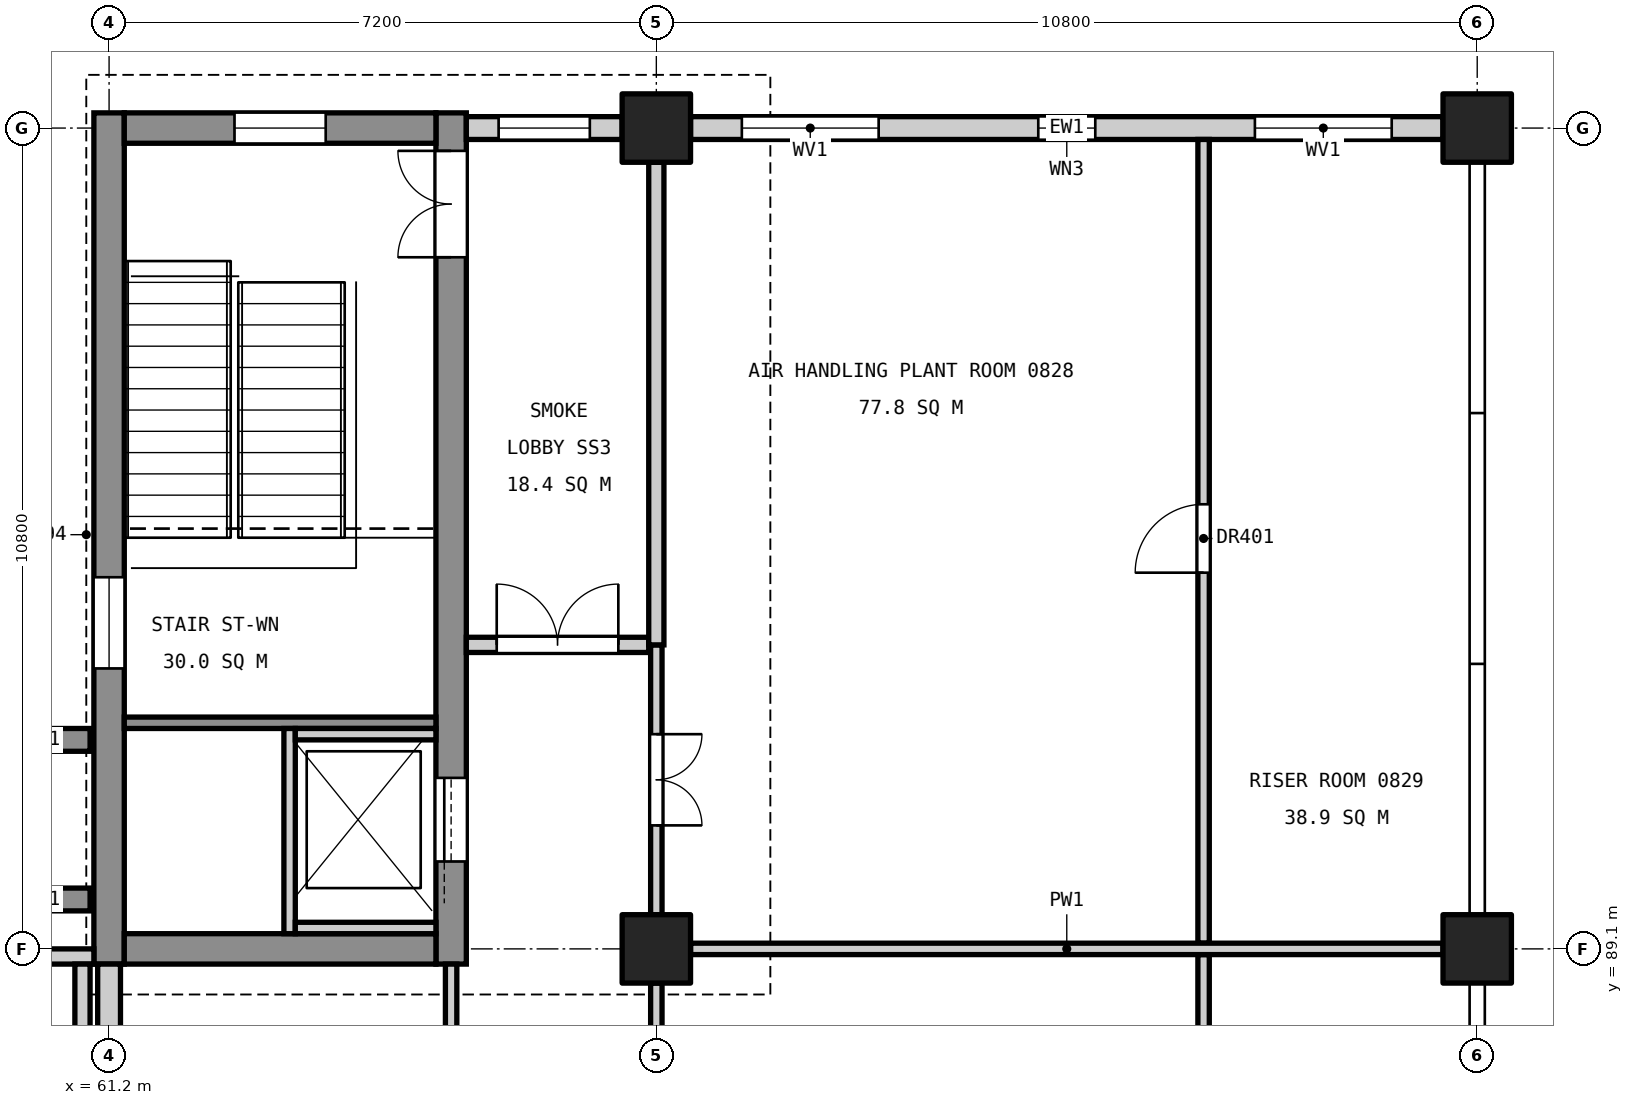
"""IFC4 building model, lengths in metres.
Left out: names, types, materials, properties, quantities, classifications, styles, units other than length and angle.
Written with IfcOpenShell. Run it as: python <this file> out.ifc"""

import sys

from ifc_helpers import new_model, si_unit, direction, frame, frame_2d, origin, origin_2d, place, context, subcontext, project, spatial, rectangle, extrude, element, fill, save


model = new_model("IFC4")
c1 = context("Model", 3, precision=1e-05, world=origin(), true_north=direction((0.0, 1.0)))
c2 = subcontext(c1, "Body", "Model", "MODEL_VIEW")
j1 = project(units=[si_unit("LENGTHUNIT", "METRE"), si_unit("PLANEANGLEUNIT", "RADIAN")], contexts=[c1])
p1 = place(None, origin())
s1 = spatial("IfcSite", under=j1, at=p1, CompositionType="ELEMENT")
p2 = place(p1, origin())
s2 = spatial("IfcBuilding", under=s1, at=p2, CompositionType="ELEMENT")
p3 = place(p2, frame((0.0, 0.0, 41.4)))
s3 = spatial("IfcBuildingStorey", under=s2, at=p3, CompositionType="ELEMENT", Elevation=41.4)
for number, where, z_axis, x_axis in (
    (1, (68.4, 89.1, 0.0), (0.0, 0.0, 1.0), (1.0, 0.0, 0.0)),
    (2, (68.4, 99.9, 0.0), (0.0, 0.0, 1.0), (1.0, 0.0, 0.0)),
    (3, (79.2, 89.1, 0.0), (0.0, 0.0, 1.0), (1.0, 0.0, 0.0)),
    (4, (79.2, 99.9, 0.0), (0.0, 0.0, 1.0), (1.0, 0.0, 0.0)),
):
    element("IfcColumn", number, at=place(p3, frame(where, z_axis=z_axis, x_axis=x_axis)), inside=s3, PredefinedType="COLUMN", context=c2, shape_type="SweptSolid", body=[
        extrude(rectangle(XDim=0.9, YDim=0.9, at=origin_2d()), origin(), (0.0, 0.0, 1.0), 4.8),
    ])
p4 = place(p3, frame((61.2, 88.9, 0.0), z_axis=(0.0, 0.0, 1.0), x_axis=(0.0, 1.0, 0.0)))
e5 = element("IfcWall", 5, at=p4, inside=s3, PredefinedType="SHEAR", context=c2, shape_type="SweptSolid", body=[
    extrude(rectangle(XDim=11.2, YDim=0.4, at=frame_2d((5.6, 0.0))), origin(), (0.0, 0.0, 1.0), 4.55),
])
p5 = place(p4, frame((3.89, 0.0, 3.4)))
e6 = element("IfcOpeningElement", 6, at=p5, cuts=e5, PredefinedType="OPENING", context=c2, shape_type="SweptSolid", body=[
    extrude(rectangle(XDim=1.2, YDim=0.9, at=frame_2d((0.6, 0.45))), frame((0.0, 0.21, 0.0), z_axis=(0.0, -1.0, 0.0), x_axis=(1.0, 0.0, 0.0)), (0.0, 0.0, 1.0), 0.42),
])
p6 = place(p3, frame((65.7, 88.9, 0.0), z_axis=(0.0, 0.0, 1.0), x_axis=(0.0, 1.0, 0.0)))
e7 = element("IfcWall", 7, at=p6, inside=s3, PredefinedType="SHEAR", context=c2, shape_type="SweptSolid", body=[
    extrude(rectangle(XDim=11.2, YDim=0.4, at=frame_2d((5.6, 0.0))), origin(), (0.0, 0.0, 1.0), 4.55),
])
p7 = place(p6, frame((9.3, 0.0, 0.0)))
e8 = element("IfcOpeningElement", 8, at=p7, cuts=e7, PredefinedType="OPENING", context=c2, shape_type="SweptSolid", body=[
    extrude(rectangle(XDim=1.4, YDim=2.1, at=frame_2d((0.7, 1.05))), frame((0.0, 0.21, 0.0), z_axis=(0.0, -1.0, 0.0), x_axis=(1.0, 0.0, 0.0)), (0.0, 0.0, 1.0), 0.42),
])
p8 = place(p6, frame((1.35, 0.0, 0.0)))
e9 = element("IfcOpeningElement", 9, at=p8, cuts=e7, PredefinedType="OPENING", context=c2, shape_type="SweptSolid", body=[
    extrude(rectangle(XDim=1.1, YDim=2.1, at=frame_2d((0.55, 1.05))), frame((0.0, 0.21, 0.0), z_axis=(0.0, -1.0, 0.0), x_axis=(1.0, 0.0, 0.0)), (0.0, 0.0, 1.0), 0.42),
])
p9 = place(p3, frame((61.4, 89.1, 0.0), z_axis=(0.0, 0.0, 1.0), x_axis=(1.0, 0.0, 0.0)))
e10 = element("IfcWall", 10, at=p9, inside=s3, PredefinedType="SHEAR", context=c2, shape_type="SweptSolid", body=[
    extrude(rectangle(XDim=4.1, YDim=0.4, at=frame_2d((2.05, 0.0))), origin(), (0.0, 0.0, 1.0), 4.55),
])
p10 = place(p3, frame((61.4, 99.9, 0.0), z_axis=(0.0, 0.0, 1.0), x_axis=(1.0, 0.0, 0.0)))
e11 = element("IfcWall", 11, at=p10, inside=s3, PredefinedType="SHEAR", context=c2, shape_type="SweptSolid", body=[
    extrude(rectangle(XDim=4.1, YDim=0.4, at=frame_2d((2.05, 0.0))), origin(), (0.0, 0.0, 1.0), 4.55),
])
p11 = place(p10, frame((1.45, 0.0, 3.4)))
e12 = element("IfcOpeningElement", 12, at=p11, cuts=e11, PredefinedType="OPENING", context=c2, shape_type="SweptSolid", body=[
    extrude(rectangle(XDim=1.2, YDim=0.9, at=frame_2d((0.6, 0.45))), frame((0.0, 0.21, 0.0), z_axis=(0.0, -1.0, 0.0), x_axis=(1.0, 0.0, 0.0)), (0.0, 0.0, 1.0), 0.42),
])
for number, where, z_axis, x_axis in (
    (13, (60.95, 89.75, 0.0), (0.0, 0.0, 1.0), (-1.0, 0.0, 0.0)),
    (14, (60.95, 91.85, 0.0), (0.0, 0.0, 1.0), (-1.0, 0.0, 0.0)),
):
    element("IfcWall", number, at=place(p3, frame(where, z_axis=z_axis, x_axis=x_axis)), inside=s3, PredefinedType="SHEAR", context=c2, shape_type="SweptSolid", body=[
        extrude(rectangle(XDim=1.25, YDim=0.3, at=frame_2d((0.625, 0.0))), origin(), (0.0, 0.0, 1.0), 4.8),
    ])
p12 = place(p3, frame((61.4, 92.075, 0.0), z_axis=(0.0, 0.0, 1.0), x_axis=(1.0, 0.0, 0.0)))
e15 = element("IfcWall", 15, at=p12, inside=s3, PredefinedType="SOLIDWALL", context=c2, shape_type="SweptSolid", body=[
    extrude(rectangle(XDim=4.1, YDim=0.15, at=frame_2d((2.05, 0.0))), origin(), (0.0, 0.0, 1.0), 4.55),
])
p13 = place(p3, frame((63.575, 92.0, 0.0), z_axis=(0.0, 0.0, 1.0), x_axis=(0.0, -1.0, 0.0)))
e16 = element("IfcWall", 16, at=p13, inside=s3, PredefinedType="SOLIDWALL", context=c2, shape_type="SweptSolid", body=[
    extrude(rectangle(XDim=2.7, YDim=0.15, at=frame_2d((1.35, 0.0))), origin(), (0.0, 0.0, 1.0), 4.8),
])
for number, where, z_axis, x_axis in (
    (17, (63.65, 91.925, 0.0), (0.0, 0.0, 1.0), (1.0, 0.0, 0.0)),
    (18, (63.65, 89.375, 0.0), (0.0, 0.0, 1.0), (1.0, 0.0, 0.0)),
):
    element("IfcWall", number, at=place(p3, frame(where, z_axis=z_axis, x_axis=x_axis)), inside=s3, PredefinedType="SOLIDWALL", context=c2, shape_type="SweptSolid", body=[
        extrude(rectangle(XDim=1.85, YDim=0.15, at=frame_2d((0.925, 0.0))), origin(), (0.0, 0.0, 1.0), 4.8),
    ])
p14 = place(p3, frame((57.6, 89.0, 0.0), z_axis=(0.0, 0.0, 1.0), x_axis=(1.0, 0.0, 0.0)))
e19 = element("IfcWall", 19, at=p14, inside=s3, PredefinedType="PARAPET", context=c2, shape_type="SweptSolid", body=[
    extrude(rectangle(XDim=3.4, YDim=0.2, at=frame_2d((1.7, 0.0))), origin(), (0.0, 0.0, 1.0), 1.2),
])
p15 = place(p3, frame((60.85, 88.9, 0.0), z_axis=(0.0, 0.0, 1.0), x_axis=(0.0, -1.0, 0.0)))
e20 = element("IfcWall", 20, at=p15, inside=s3, PredefinedType="PARAPET", context=c2, shape_type="SweptSolid", body=[
    extrude(rectangle(XDim=3.25, YDim=0.2, at=frame_2d((1.625, 0.0))), origin(), (0.0, 0.0, 1.0), 1.2),
])
p16 = place(p3, frame((61.2, 85.35, 0.0), z_axis=(0.0, 0.0, 1.0), x_axis=(0.0, 1.0, 0.0)))
e21 = element("IfcWall", 21, at=p16, inside=s3, PredefinedType="STANDARD", context=c2, shape_type="SweptSolid", body=[
    extrude(rectangle(XDim=3.55, YDim=0.3, at=frame_2d((1.775, 0.0))), origin(), (0.0, 0.0, 1.0), 3.65),
])
p17 = place(p16, frame((1.475, 0.0, 0.8)))
e22 = element("IfcOpeningElement", 22, at=p17, cuts=e21, PredefinedType="OPENING", context=c2, shape_type="SweptSolid", body=[
    extrude(rectangle(XDim=0.75, YDim=1.2, at=frame_2d((0.375, 0.6))), frame((0.0, 0.16, 0.0), z_axis=(0.0, -1.0, 0.0), x_axis=(1.0, 0.0, 0.0)), (0.0, 0.0, 1.0), 0.32),
])
p18 = place(p3, frame((65.9, 99.9, 0.0), z_axis=(0.0, 0.0, 1.0), x_axis=(1.0, 0.0, 0.0)))
e23 = element("IfcWall", 23, at=p18, inside=s3, PredefinedType="STANDARD", context=c2, shape_type="SweptSolid", body=[
    extrude(rectangle(XDim=2.05, YDim=0.3, at=frame_2d((1.025, 0.0))), origin(), (0.0, 0.0, 1.0), 3.85),
])
p19 = place(p18, frame((0.425, 0.0, 0.9)))
e24 = element("IfcOpeningElement", 24, at=p19, cuts=e23, PredefinedType="OPENING", context=c2, shape_type="SweptSolid", body=[
    extrude(rectangle(XDim=1.2, YDim=2.4, at=frame_2d((0.6, 1.2))), frame((0.0, 0.16, 0.0), z_axis=(0.0, -1.0, 0.0), x_axis=(1.0, 0.0, 0.0)), (0.0, 0.0, 1.0), 0.32),
])
p20 = place(p3, frame((68.85, 99.9, 0.0), z_axis=(0.0, 0.0, 1.0), x_axis=(1.0, 0.0, 0.0)))
e25 = element("IfcWall", 25, at=p20, inside=s3, PredefinedType="STANDARD", context=c2, shape_type="SweptSolid", body=[
    extrude(rectangle(XDim=9.9, YDim=0.3, at=frame_2d((4.95, 0.0))), origin(), (0.0, 0.0, 1.0), 3.85),
])
p21 = place(p20, frame((0.675, 0.0, 0.9)))
e26 = element("IfcOpeningElement", 26, at=p21, cuts=e25, PredefinedType="OPENING", context=c2, shape_type="SweptSolid", body=[
    extrude(rectangle(XDim=1.8, YDim=2.4, at=frame_2d((0.9, 1.2))), frame((0.0, 0.16, 0.0), z_axis=(0.0, -1.0, 0.0), x_axis=(1.0, 0.0, 0.0)), (0.0, 0.0, 1.0), 0.32),
])
p22 = place(p20, frame((4.575, 0.0, 0.8)))
e27 = element("IfcOpeningElement", 27, at=p22, cuts=e25, PredefinedType="OPENING", context=c2, shape_type="SweptSolid", body=[
    extrude(rectangle(XDim=0.75, YDim=1.2, at=frame_2d((0.375, 0.6))), frame((0.0, 0.16, 0.0), z_axis=(0.0, -1.0, 0.0), x_axis=(1.0, 0.0, 0.0)), (0.0, 0.0, 1.0), 0.32),
])
p23 = place(p20, frame((7.425, 0.0, 0.9)))
e28 = element("IfcOpeningElement", 28, at=p23, cuts=e25, PredefinedType="OPENING", context=c2, shape_type="SweptSolid", body=[
    extrude(rectangle(XDim=1.8, YDim=2.4, at=frame_2d((0.9, 1.2))), frame((0.0, 0.16, 0.0), z_axis=(0.0, -1.0, 0.0), x_axis=(1.0, 0.0, 0.0)), (0.0, 0.0, 1.0), 0.32),
])
p24 = place(p3, frame((65.7, 78.45, 0.0), z_axis=(0.0, 0.0, 1.0), x_axis=(0.0, 1.0, 0.0)))
e29 = element("IfcWall", 29, at=p24, inside=s3, PredefinedType="PARTITIONING", context=c2, shape_type="SweptSolid", body=[
    extrude(rectangle(XDim=10.45, YDim=0.15, at=frame_2d((5.225, 0.0))), origin(), (0.0, 0.0, 1.0), 3.55),
])
p25 = place(p24, frame((8.35, 0.0, 0.0)))
e30 = element("IfcOpeningElement", 30, at=p25, cuts=e29, PredefinedType="OPENING", context=c2, shape_type="SweptSolid", body=[
    extrude(rectangle(XDim=1.0, YDim=2.1, at=frame_2d((0.5, 1.05))), frame((0.0, 0.085, 0.0), z_axis=(0.0, -1.0, 0.0), x_axis=(1.0, 0.0, 0.0)), (0.0, 0.0, 1.0), 0.17),
])
p26 = place(p24, frame((2.95, 0.0, 0.0)))
e31 = element("IfcOpeningElement", 31, at=p26, cuts=e29, PredefinedType="OPENING", context=c2, shape_type="SweptSolid", body=[
    extrude(rectangle(XDim=1.0, YDim=2.1, at=frame_2d((0.5, 1.05))), frame((0.0, 0.085, 0.0), z_axis=(0.0, -1.0, 0.0), x_axis=(1.0, 0.0, 0.0)), (0.0, 0.0, 1.0), 0.17),
])
p27 = place(p3, frame((65.9, 93.1, 0.0), z_axis=(0.0, 0.0, 1.0), x_axis=(1.0, 0.0, 0.0)))
e32 = element("IfcWall", 32, at=p27, inside=s3, PredefinedType="PARTITIONING", context=c2, shape_type="SweptSolid", body=[
    extrude(rectangle(XDim=2.4, YDim=0.2, at=frame_2d((1.2, 0.0))), origin(), (0.0, 0.0, 1.0), 3.55),
])
p28 = place(p27, frame((0.4, 0.0, 0.0)))
e33 = element("IfcOpeningElement", 33, at=p28, cuts=e32, PredefinedType="OPENING", context=c2, shape_type="SweptSolid", body=[
    extrude(rectangle(XDim=1.6, YDim=2.1, at=frame_2d((0.8, 1.05))), frame((0.0, 0.11, 0.0), z_axis=(0.0, -1.0, 0.0), x_axis=(1.0, 0.0, 0.0)), (0.0, 0.0, 1.0), 0.22),
])
p29 = place(p3, frame((68.4, 78.75, 0.0), z_axis=(0.0, 0.0, 1.0), x_axis=(0.0, 1.0, 0.0)))
e34 = element("IfcWall", 34, at=p29, inside=s3, PredefinedType="PARTITIONING", context=c2, shape_type="SweptSolid", body=[
    extrude(rectangle(XDim=9.9, YDim=0.15, at=frame_2d((4.95, 0.0))), origin(), (0.0, 0.0, 1.0), 3.55),
])
p30 = place(p29, frame((5.925, 0.0, 0.0)))
e35 = element("IfcOpeningElement", 35, at=p30, cuts=e34, PredefinedType="OPENING", context=c2, shape_type="SweptSolid", body=[
    extrude(rectangle(XDim=1.2, YDim=2.1, at=frame_2d((0.6, 1.05))), frame((0.0, 0.085, 0.0), z_axis=(0.0, -1.0, 0.0), x_axis=(1.0, 0.0, 0.0)), (0.0, 0.0, 1.0), 0.17),
])
p31 = place(p29, frame((0.975, 0.0, 0.0)))
e36 = element("IfcOpeningElement", 36, at=p31, cuts=e34, PredefinedType="OPENING", context=c2, shape_type="SweptSolid", body=[
    extrude(rectangle(XDim=1.2, YDim=2.1, at=frame_2d((0.6, 1.05))), frame((0.0, 0.085, 0.0), z_axis=(0.0, -1.0, 0.0), x_axis=(1.0, 0.0, 0.0)), (0.0, 0.0, 1.0), 0.17),
])
p32 = place(p3, frame((68.4, 89.55, 0.0), z_axis=(0.0, 0.0, 1.0), x_axis=(0.0, 1.0, 0.0)))
e37 = element("IfcWall", 37, at=p32, inside=s3, PredefinedType="PARTITIONING", context=c2, shape_type="SweptSolid", body=[
    extrude(rectangle(XDim=3.55, YDim=0.15, at=frame_2d((1.775, 0.0))), origin(), (0.0, 0.0, 1.0), 3.55),
])
p33 = place(p32, frame((1.175, 0.0, 0.0)))
e38 = element("IfcOpeningElement", 38, at=p33, cuts=e37, PredefinedType="OPENING", context=c2, shape_type="SweptSolid", body=[
    extrude(rectangle(XDim=1.2, YDim=2.1, at=frame_2d((0.6, 1.05))), frame((0.0, 0.085, 0.0), z_axis=(0.0, -1.0, 0.0), x_axis=(1.0, 0.0, 0.0)), (0.0, 0.0, 1.0), 0.17),
])
p34 = place(p3, frame((68.4, 93.1, 0.0), z_axis=(0.0, 0.0, 1.0), x_axis=(0.0, 1.0, 0.0)))
e39 = element("IfcWall", 39, at=p34, inside=s3, PredefinedType="PARTITIONING", context=c2, shape_type="SweptSolid", body=[
    extrude(rectangle(XDim=6.35, YDim=0.2, at=frame_2d((3.175, 0.0))), origin(), (0.0, 0.0, 1.0), 3.55),
])
p35 = place(p3, frame((75.6, 81.975, 0.0), z_axis=(0.0, 0.0, 1.0), x_axis=(0.0, 1.0, 0.0)))
e40 = element("IfcWall", 40, at=p35, inside=s3, PredefinedType="PARTITIONING", context=c2, shape_type="SweptSolid", body=[
    extrude(rectangle(XDim=7.05, YDim=0.15, at=frame_2d((3.525, 0.0))), origin(), (0.0, 0.0, 1.0), 3.55),
])
p36 = place(p35, frame((3.075, 0.0, 0.0)))
e41 = element("IfcOpeningElement", 41, at=p36, cuts=e40, PredefinedType="OPENING", context=c2, shape_type="SweptSolid", body=[
    extrude(rectangle(XDim=0.9, YDim=2.1, at=frame_2d((0.45, 1.05))), frame((0.0, 0.085, 0.0), z_axis=(0.0, -1.0, 0.0), x_axis=(1.0, 0.0, 0.0)), (0.0, 0.0, 1.0), 0.17),
])
p37 = place(p3, frame((75.6, 89.175, 0.0), z_axis=(0.0, 0.0, 1.0), x_axis=(0.0, 1.0, 0.0)))
e42 = element("IfcWall", 42, at=p37, inside=s3, PredefinedType="PARTITIONING", context=c2, shape_type="SweptSolid", body=[
    extrude(rectangle(XDim=10.575, YDim=0.15, at=frame_2d((5.288, 0.0))), origin(), (0.0, 0.0, 1.0), 3.55),
])
p38 = place(p37, frame((4.875, 0.0, 0.0)))
e43 = element("IfcOpeningElement", 43, at=p38, cuts=e42, PredefinedType="OPENING", context=c2, shape_type="SweptSolid", body=[
    extrude(rectangle(XDim=0.9, YDim=2.1, at=frame_2d((0.45, 1.05))), frame((0.0, 0.085, 0.0), z_axis=(0.0, -1.0, 0.0), x_axis=(1.0, 0.0, 0.0)), (0.0, 0.0, 1.0), 0.17),
])
p39 = place(p3, frame((68.85, 89.1, 0.0), z_axis=(0.0, 0.0, 1.0), x_axis=(1.0, 0.0, 0.0)))
e44 = element("IfcWall", 44, at=p39, inside=s3, PredefinedType="PARTITIONING", context=c2, shape_type="SweptSolid", body=[
    extrude(rectangle(XDim=9.9, YDim=0.15, at=frame_2d((4.95, 0.0))), origin(), (0.0, 0.0, 1.0), 3.85),
])
p40 = place(p7, origin())
e45 = element("IfcDoor", 45, at=p40, inside=s3, OperationType="DOUBLE_DOOR_SINGLE_SWING", PredefinedType="DOOR", context=c2, shape_type="SweptSolid", body=[
    extrude(rectangle(XDim=1.4, YDim=2.1, at=frame_2d((0.7, 1.05))), frame((0.0, 0.025, 0.0), z_axis=(0.0, -1.0, 0.0), x_axis=(1.0, 0.0, 0.0)), (0.0, 0.0, 1.0), 0.05),
])
fill(e8, e45)
p41 = place(p8, origin())
e46 = element("IfcDoor", 46, at=p41, inside=s3, OperationType="SLIDING_TO_LEFT", PredefinedType="DOOR", context=c2, shape_type="SweptSolid", body=[
    extrude(rectangle(XDim=1.1, YDim=2.1, at=frame_2d((0.55, 1.05))), frame((0.0, 0.025, 0.0), z_axis=(0.0, -1.0, 0.0), x_axis=(1.0, 0.0, 0.0)), (0.0, 0.0, 1.0), 0.05),
])
fill(e9, e46)
p42 = place(p19, origin())
e47 = element("IfcWindow", 47, at=p42, inside=s3, PartitioningType="SINGLE_PANEL", PredefinedType="WINDOW", context=c2, shape_type="SweptSolid", body=[
    extrude(rectangle(XDim=1.2, YDim=2.4, at=frame_2d((0.6, 1.2))), frame((0.0, 0.03, 0.0), z_axis=(0.0, -1.0, 0.0), x_axis=(1.0, 0.0, 0.0)), (0.0, 0.0, 1.0), 0.06),
])
fill(e24, e47)
p43 = place(p21, origin())
e48 = element("IfcWindow", 48, at=p43, inside=s3, PartitioningType="SINGLE_PANEL", PredefinedType="WINDOW", context=c2, shape_type="SweptSolid", body=[
    extrude(rectangle(XDim=1.8, YDim=2.4, at=frame_2d((0.9, 1.2))), frame((0.0, 0.03, 0.0), z_axis=(0.0, -1.0, 0.0), x_axis=(1.0, 0.0, 0.0)), (0.0, 0.0, 1.0), 0.06),
])
fill(e26, e48)
p44 = place(p22, origin())
e49 = element("IfcWindow", 49, at=p44, inside=s3, PartitioningType="SINGLE_PANEL", PredefinedType="WINDOW", context=c2, shape_type="SweptSolid", body=[
    extrude(rectangle(XDim=0.75, YDim=1.2, at=frame_2d((0.375, 0.6))), frame((0.0, 0.03, 0.0), z_axis=(0.0, -1.0, 0.0), x_axis=(1.0, 0.0, 0.0)), (0.0, 0.0, 1.0), 0.06),
])
fill(e27, e49)
p45 = place(p23, origin())
e50 = element("IfcWindow", 50, at=p45, inside=s3, PartitioningType="SINGLE_PANEL", PredefinedType="WINDOW", context=c2, shape_type="SweptSolid", body=[
    extrude(rectangle(XDim=1.8, YDim=2.4, at=frame_2d((0.9, 1.2))), frame((0.0, 0.03, 0.0), z_axis=(0.0, -1.0, 0.0), x_axis=(1.0, 0.0, 0.0)), (0.0, 0.0, 1.0), 0.06),
])
fill(e28, e50)
p46 = place(p5, origin())
e51 = element("IfcWindow", 51, at=p46, inside=s3, PartitioningType="SINGLE_PANEL", PredefinedType="WINDOW", context=c2, shape_type="SweptSolid", body=[
    extrude(rectangle(XDim=1.2, YDim=0.9, at=frame_2d((0.6, 0.45))), frame((0.0, 0.03, 0.0), z_axis=(0.0, -1.0, 0.0), x_axis=(1.0, 0.0, 0.0)), (0.0, 0.0, 1.0), 0.06),
])
fill(e6, e51)
p47 = place(p11, origin())
e52 = element("IfcWindow", 52, at=p47, inside=s3, PartitioningType="SINGLE_PANEL", PredefinedType="WINDOW", context=c2, shape_type="SweptSolid", body=[
    extrude(rectangle(XDim=1.2, YDim=0.9, at=frame_2d((0.6, 0.45))), frame((0.0, 0.03, 0.0), z_axis=(0.0, -1.0, 0.0), x_axis=(1.0, 0.0, 0.0)), (0.0, 0.0, 1.0), 0.06),
])
fill(e12, e52)
p48 = place(p33, frame((1.2, 0.0, 0.0), z_axis=(0.0, 0.0, 1.0), x_axis=(-1.0, 0.0, 0.0)))
e53 = element("IfcDoor", 53, at=p48, inside=s3, OperationType="DOUBLE_DOOR_SINGLE_SWING", PredefinedType="DOOR", context=c2, shape_type="SweptSolid", body=[
    extrude(rectangle(XDim=1.2, YDim=2.1, at=frame_2d((0.6, 1.05))), frame((0.0, 0.025, 0.0), z_axis=(0.0, -1.0, 0.0), x_axis=(1.0, 0.0, 0.0)), (0.0, 0.0, 1.0), 0.05),
])
fill(e38, e53)
p49 = place(p38, origin())
e54 = element("IfcDoor", 54, at=p49, inside=s3, OperationType="SINGLE_SWING_LEFT", PredefinedType="DOOR", context=c2, shape_type="SweptSolid", body=[
    extrude(rectangle(XDim=0.9, YDim=2.1, at=frame_2d((0.45, 1.05))), frame((0.0, 0.025, 0.0), z_axis=(0.0, -1.0, 0.0), x_axis=(1.0, 0.0, 0.0)), (0.0, 0.0, 1.0), 0.05),
])
fill(e43, e54)
p50 = place(p28, origin())
e55 = element("IfcDoor", 55, at=p50, inside=s3, OperationType="DOUBLE_DOOR_SINGLE_SWING", PredefinedType="DOOR", context=c2, shape_type="SweptSolid", body=[
    extrude(rectangle(XDim=1.6, YDim=2.1, at=frame_2d((0.8, 1.05))), frame((0.0, 0.025, 0.0), z_axis=(0.0, -1.0, 0.0), x_axis=(1.0, 0.0, 0.0)), (0.0, 0.0, 1.0), 0.05),
])
fill(e33, e55)
save(model, sys.argv[1])
